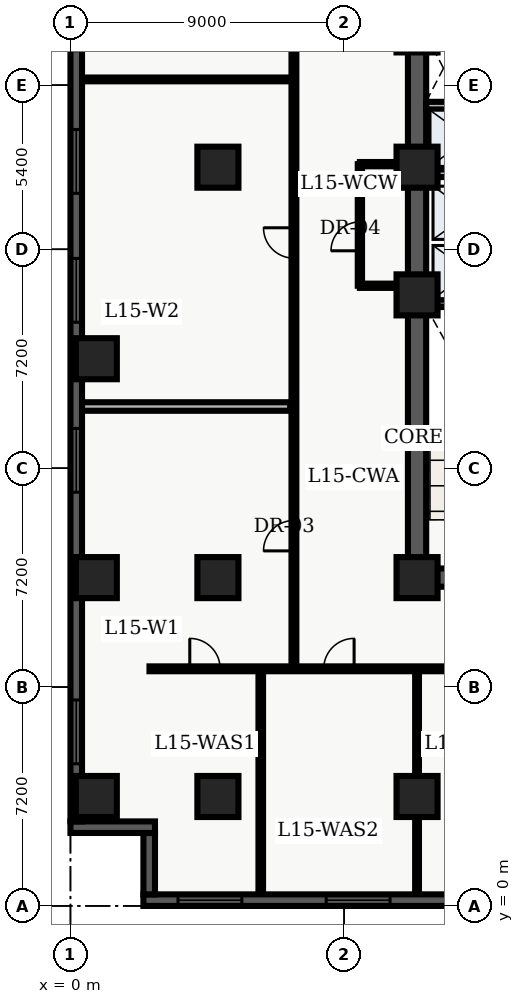
"""IFC4 building model, lengths in metres.
Left out: names, types, materials, properties, quantities, classifications, styles, units other than length and angle.
Written with IfcOpenShell. Run it as: python <this file> out.ifc"""

import sys

from ifc_helpers import new_model, entity, si_unit, converted_unit, direction, frame, origin_with_axes, origin_2d_with_axis, place, context, subcontext, project, spatial, polyline, rectangle, outline, extrude, element, fill, save


model = new_model("IFC4")
c1 = context("Model", 3, precision=1e-05, world=origin_with_axes(), true_north=direction((0.0, 1.0)))
c2 = subcontext(c1, "Body", "Model", "MODEL_VIEW")
j1 = project(units=[si_unit("LENGTHUNIT", "METRE"), converted_unit("PLANEANGLEUNIT", "DEGREE", entity("IfcPlaneAngleMeasure", 0.017), si_unit("PLANEANGLEUNIT", "RADIAN"), dimensions=[0, 0, 0, 0, 0, 0, 0])], contexts=[c1])
p1 = place(None, origin_with_axes())
s1 = spatial("IfcSite", under=j1, at=p1, CompositionType="ELEMENT")
p2 = place(p1, origin_with_axes())
s2 = spatial("IfcBuilding", under=s1, at=p2, CompositionType="ELEMENT")
p3 = place(p2, frame((0.0, 0.0, 63.9), z_axis=(0.0, 0.0, 1.0), x_axis=(1.0, 0.0, 0.0)))
s3 = spatial("IfcBuildingStorey", under=s2, at=p3, CompositionType="ELEMENT", Elevation=63.9)
p4 = place(p3, frame((11.4, 10.8, 0.0), z_axis=(0.0, 0.0, 1.0), x_axis=(0.0, 1.0, 0.0)))
e1 = element("IfcWall", 1, at=p4, inside=s3, PredefinedType="SHEAR", context=c2, shape_type="SweptSolid", body=[
    extrude(outline(polyline([(0.0, -0.3), (27.0, -0.3), (27.0, 0.3), (0.0, 0.3), (0.0, -0.3)])), origin_with_axes(), (0.0, 0.0, 1.0), 3.66),
])
p5 = place(p3, frame((11.4, 10.8, 0.0), z_axis=(0.0, 0.0, 1.0), x_axis=(1.0, 0.0, 0.0)))
e2 = element("IfcWall", 2, at=p5, inside=s3, PredefinedType="SHEAR", context=c2, shape_type="SweptSolid", body=[
    extrude(outline(polyline([(0.0, -0.3), (7.2, -0.3), (7.2, 0.3), (0.0, 0.3), (0.0, -0.3)])), origin_with_axes(), (0.0, 0.0, 1.0), 3.66),
])
p6 = place(p5, frame((2.625, 0.0, 0.0), z_axis=(0.0, 0.0, 1.0), x_axis=(1.0, 0.0, 0.0)))
e3 = element("IfcOpeningElement", 3, at=p6, cuts=e2, PredefinedType="OPENING", context=c2, shape_type="SweptSolid", body=[
    extrude(rectangle(XDim=1.05, YDim=0.62, at=origin_2d_with_axis()), origin_with_axes(), (0.0, 0.0, 1.0), 2.15),
])
p7 = place(p3, frame((11.7, 19.825, 0.0), z_axis=(0.0, 0.0, 1.0), x_axis=(1.0, 0.0, 0.0)))
e4 = element("IfcWall", 4, at=p7, inside=s3, PredefinedType="SHEAR", context=c2, shape_type="SweptSolid", body=[
    extrude(outline(polyline([(0.0, -0.125), (6.6, -0.125), (6.6, 0.125), (0.0, 0.125), (0.0, -0.125)])), origin_with_axes(), (0.0, 0.0, 1.0), 3.66),
])
p8 = place(p3, frame((11.7, 24.1, 0.0), z_axis=(0.0, 0.0, 1.0), x_axis=(1.0, 0.0, 0.0)))
e5 = element("IfcWall", 5, at=p8, inside=s3, PredefinedType="SOLIDWALL", context=c2, shape_type="SweptSolid", body=[
    extrude(outline(polyline([(0.0, -0.125), (6.6, -0.125), (6.6, 0.125), (0.0, 0.125), (0.0, -0.125)])), origin_with_axes(), (0.0, 0.0, 1.0), 2.7),
])
p9 = place(p8, frame((3.75, 0.0, 0.0), z_axis=(0.0, 0.0, 1.0), x_axis=(1.0, 0.0, 0.0)))
e6 = element("IfcOpeningElement", 6, at=p9, cuts=e5, PredefinedType="OPENING", context=c2, shape_type="SweptSolid", body=[
    extrude(rectangle(XDim=0.9, YDim=0.27, at=origin_2d_with_axis()), origin_with_axes(), (0.0, 0.0, 1.0), 2.15),
])
p10 = place(p3, frame((11.7, 26.325, 0.0), z_axis=(0.0, 0.0, 1.0), x_axis=(1.0, 0.0, 0.0)))
e7 = element("IfcWall", 7, at=p10, inside=s3, PredefinedType="SOLIDWALL", context=c2, shape_type="SweptSolid", body=[
    extrude(outline(polyline([(0.0, -0.125), (6.6, -0.125), (6.6, 0.125), (0.0, 0.125), (0.0, -0.125)])), origin_with_axes(), (0.0, 0.0, 1.0), 2.7),
])
p11 = place(p10, frame((3.5, 0.0, 0.0), z_axis=(0.0, 0.0, 1.0), x_axis=(1.0, 0.0, 0.0)))
e8 = element("IfcOpeningElement", 8, at=p11, cuts=e7, PredefinedType="OPENING", context=c2, shape_type="SweptSolid", body=[
    extrude(rectangle(XDim=0.9, YDim=0.27, at=origin_2d_with_axis()), origin_with_axes(), (0.0, 0.0, 1.0), 2.15),
])
for number, where, z_axis, x_axis in (
    (9, (11.4, 3.6, 0.0), (0.0, 0.0, 1.0), (1.0, 0.0, 0.0)),
    (10, (11.4, 10.8, 0.0), (0.0, 0.0, 1.0), (1.0, 0.0, 0.0)),
    (11, (11.4, 20.1, 0.0), (0.0, 0.0, 1.0), (1.0, 0.0, 0.0)),
    (12, (11.4, 24.3, 0.0), (0.0, 0.0, 1.0), (1.0, 0.0, 0.0)),
    (13, (11.4, 28.75, 0.0), (0.0, 0.0, 1.0), (1.0, 0.0, 0.0)),
    (14, (4.85, 3.6, 0.0), (0.0, 0.0, 1.0), (1.0, 0.0, 0.0)),
    (15, (4.85, 10.8, 0.0), (0.0, 0.0, 1.0), (1.0, 0.0, 0.0)),
    (16, (4.85, 24.3, 0.0), (0.0, 0.0, 1.0), (1.0, 0.0, 0.0)),
    (17, (0.85, 3.6, 0.0), (0.0, 0.0, 1.0), (1.0, 0.0, 0.0)),
    (18, (0.85, 10.8, 0.0), (0.0, 0.0, 1.0), (1.0, 0.0, 0.0)),
    (19, (0.85, 18.0, 0.0), (0.0, 0.0, 1.0), (1.0, 0.0, 0.0)),
):
    element("IfcColumn", number, at=place(p3, frame(where, z_axis=z_axis, x_axis=x_axis)), inside=s3, PredefinedType="COLUMN", context=c2, shape_type="SweptSolid", body=[
        extrude(rectangle(XDim=1.35, YDim=1.35, at=origin_2d_with_axis()), origin_with_axes(), (0.0, 0.0, 1.0), 3.9),
    ])
p12 = place(p3, frame((9.52, 20.4, 0.0), z_axis=(0.0, 0.0, 1.0), x_axis=(0.0, 1.0, 0.0)))
e20 = element("IfcWall", 20, at=p12, inside=s3, PredefinedType="PARTITIONING", context=c2, shape_type="SweptSolid", body=[
    extrude(outline(polyline([(0.0, -0.07), (4.0, -0.07), (4.0, 0.07), (0.0, 0.07), (0.0, -0.07)])), origin_with_axes(), (0.0, 0.0, 1.0), 2.7),
])
p13 = place(p12, frame((1.625, 0.0, 0.0), z_axis=(0.0, 0.0, 1.0), x_axis=(1.0, 0.0, 0.0)))
e21 = element("IfcOpeningElement", 21, at=p13, cuts=e20, PredefinedType="OPENING", context=c2, shape_type="SweptSolid", body=[
    extrude(rectangle(XDim=0.95, YDim=0.16, at=origin_2d_with_axis()), origin_with_axes(), (0.0, 0.0, 1.0), 2.15),
])
for number, where, z_axis, x_axis in (
    (22, (9.52, 20.4, 0.0), (0.0, 0.0, 1.0), (1.0, 0.0, 0.0)),
    (23, (9.52, 24.4, 0.0), (0.0, 0.0, 1.0), (1.0, 0.0, 0.0)),
):
    element("IfcWall", number, at=place(p3, frame(where, z_axis=z_axis, x_axis=x_axis)), inside=s3, PredefinedType="PARTITIONING", context=c2, shape_type="SweptSolid", body=[
        extrude(outline(polyline([(0.0, -0.07), (1.58, -0.07), (1.58, 0.07), (0.0, 0.07), (0.0, -0.07)])), origin_with_axes(), (0.0, 0.0, 1.0), 2.7),
    ])
p14 = place(p3, frame((2.6, 7.8, 0.0), z_axis=(0.0, 0.0, 1.0), x_axis=(1.0, 0.0, 0.0)))
e24 = element("IfcWall", 24, at=p14, inside=s3, PredefinedType="PARTITIONING", context=c2, shape_type="SweptSolid", body=[
    extrude(outline(polyline([(0.0, -0.08), (18.55, -0.08), (18.55, 0.08), (0.0, 0.08), (0.0, -0.08)])), origin_with_axes(), (0.0, 0.0, 1.0), 2.7),
])
p15 = place(p14, frame((1.825, 0.0, 0.0), z_axis=(0.0, 0.0, 1.0), x_axis=(1.0, 0.0, 0.0)))
e25 = element("IfcOpeningElement", 25, at=p15, cuts=e24, PredefinedType="OPENING", context=c2, shape_type="SweptSolid", body=[
    extrude(rectangle(XDim=1.0, YDim=0.18, at=origin_2d_with_axis()), origin_with_axes(), (0.0, 0.0, 1.0), 2.15),
])
p16 = place(p14, frame((6.229, 0.0, 0.0), z_axis=(0.0, 0.0, 1.0), x_axis=(1.0, 0.0, 0.0)))
e26 = element("IfcOpeningElement", 26, at=p16, cuts=e24, PredefinedType="OPENING", context=c2, shape_type="SweptSolid", body=[
    extrude(rectangle(XDim=1.0, YDim=0.18, at=origin_2d_with_axis()), origin_with_axes(), (0.0, 0.0, 1.0), 2.15),
])
p17 = place(p14, frame((10.706, 0.0, 0.0), z_axis=(0.0, 0.0, 1.0), x_axis=(1.0, 0.0, 0.0)))
e27 = element("IfcOpeningElement", 27, at=p17, cuts=e24, PredefinedType="OPENING", context=c2, shape_type="SweptSolid", body=[
    extrude(rectangle(XDim=1.0, YDim=0.18, at=origin_2d_with_axis()), origin_with_axes(), (0.0, 0.0, 1.0), 2.15),
])
p18 = place(p14, frame((15.556, 0.0, 0.0), z_axis=(0.0, 0.0, 1.0), x_axis=(1.0, 0.0, 0.0)))
e28 = element("IfcOpeningElement", 28, at=p18, cuts=e24, PredefinedType="OPENING", context=c2, shape_type="SweptSolid", body=[
    extrude(rectangle(XDim=1.0, YDim=0.18, at=origin_2d_with_axis()), origin_with_axes(), (0.0, 0.0, 1.0), 2.15),
])
p19 = place(p3, frame((7.35, 7.8, 0.0), z_axis=(0.0, 0.0, 1.0), x_axis=(0.0, 1.0, 0.0)))
e29 = element("IfcWall", 29, at=p19, inside=s3, PredefinedType="PARTITIONING", context=c2, shape_type="SweptSolid", body=[
    extrude(outline(polyline([(0.0, -0.08), (32.7, -0.08), (32.7, 0.08), (0.0, 0.08), (0.0, -0.08)])), origin_with_axes(), (0.0, 0.0, 1.0), 2.7),
])
p20 = place(p19, frame((4.379, 0.0, 0.0), z_axis=(0.0, 0.0, 1.0), x_axis=(1.0, 0.0, 0.0)))
e30 = element("IfcOpeningElement", 30, at=p20, cuts=e29, PredefinedType="OPENING", context=c2, shape_type="SweptSolid", body=[
    extrude(rectangle(XDim=1.0, YDim=0.18, at=origin_2d_with_axis()), origin_with_axes(), (0.0, 0.0, 1.0), 2.15),
])
p21 = place(p19, frame((14.008, 0.0, 0.0), z_axis=(0.0, 0.0, 1.0), x_axis=(1.0, 0.0, 0.0)))
e31 = element("IfcOpeningElement", 31, at=p21, cuts=e29, PredefinedType="OPENING", context=c2, shape_type="SweptSolid", body=[
    extrude(rectangle(XDim=1.0, YDim=0.18, at=origin_2d_with_axis()), origin_with_axes(), (0.0, 0.0, 1.0), 2.15),
])
p22 = place(p19, frame((25.979, 0.0, 0.0), z_axis=(0.0, 0.0, 1.0), x_axis=(1.0, 0.0, 0.0)))
e32 = element("IfcOpeningElement", 32, at=p22, cuts=e29, PredefinedType="OPENING", context=c2, shape_type="SweptSolid", body=[
    extrude(rectangle(XDim=1.0, YDim=0.18, at=origin_2d_with_axis()), origin_with_axes(), (0.0, 0.0, 1.0), 2.15),
])
p23 = place(p3, frame((0.375, 16.428, 0.0), z_axis=(0.0, 0.0, 1.0), x_axis=(1.0, 0.0, 0.0)))
e33 = element("IfcWall", 33, at=p23, inside=s3, PredefinedType="PARTITIONING", context=c2, shape_type="SweptSolid", body=[
    extrude(outline(polyline([(0.0, -0.14), (6.855, -0.14), (6.855, 0.14), (0.0, 0.14), (0.0, -0.14)])), origin_with_axes(), (0.0, 0.0, 1.0), 2.7),
])
p24 = place(p3, frame((0.375, 27.187, 0.0), z_axis=(0.0, 0.0, 1.0), x_axis=(1.0, 0.0, 0.0)))
e34 = element("IfcWall", 34, at=p24, inside=s3, PredefinedType="PARTITIONING", context=c2, shape_type="SweptSolid", body=[
    extrude(outline(polyline([(0.0, -0.062), (6.855, -0.062), (6.855, 0.062), (0.0, 0.062), (0.0, -0.062)])), origin_with_axes(), (0.0, 0.0, 1.0), 2.7),
])
p25 = place(p3, frame((6.259, 0.36, 0.0), z_axis=(0.0, 0.0, 1.0), x_axis=(0.0, 1.0, 0.0)))
e35 = element("IfcWall", 35, at=p25, inside=s3, PredefinedType="PARTITIONING", context=c2, shape_type="SweptSolid", body=[
    extrude(outline(polyline([(0.0, -0.075), (7.34, -0.075), (7.34, 0.075), (0.0, 0.075), (0.0, -0.075)])), origin_with_axes(), (0.0, 0.0, 1.0), 2.7),
])
p26 = place(p3, frame((11.4, 0.36, 0.0), z_axis=(0.0, 0.0, 1.0), x_axis=(0.0, 1.0, 0.0)))
e36 = element("IfcWall", 36, at=p26, inside=s3, PredefinedType="PARTITIONING", context=c2, shape_type="SweptSolid", body=[
    extrude(outline(polyline([(0.0, -0.062), (7.34, -0.062), (7.34, 0.062), (0.0, 0.062), (0.0, -0.062)])), origin_with_axes(), (0.0, 0.0, 1.0), 2.7),
])
p27 = place(p3, frame((57.22, 0.19, 0.0), z_axis=(0.0, 0.0, 1.0), x_axis=(-1.0, 0.0, 0.0)))
e37 = element("IfcWall", 37, at=p27, inside=s3, PredefinedType="SOLIDWALL", context=c2, shape_type="SweptSolid", body=[
    extrude(outline(polyline([(0.0, -0.19), (54.82, -0.19), (54.82, 0.19), (0.0, 0.19), (0.0, -0.19)])), origin_with_axes(), (0.0, 0.0, 1.0), 3.66),
])
p28 = place(p27, frame((3.037, 0.0, 0.45), z_axis=(0.0, 0.0, 1.0), x_axis=(1.0, 0.0, 0.0)))
e38 = element("IfcOpeningElement", 38, at=p28, cuts=e37, PredefinedType="OPENING", context=c2, shape_type="SweptSolid", body=[
    extrude(rectangle(XDim=2.1, YDim=0.4, at=origin_2d_with_axis()), origin_with_axes(), (0.0, 0.0, 1.0), 2.2),
])
p29 = place(p27, frame((7.912, 0.0, 0.45), z_axis=(0.0, 0.0, 1.0), x_axis=(1.0, 0.0, 0.0)))
e39 = element("IfcOpeningElement", 39, at=p29, cuts=e37, PredefinedType="OPENING", context=c2, shape_type="SweptSolid", body=[
    extrude(rectangle(XDim=2.1, YDim=0.4, at=origin_2d_with_axis()), origin_with_axes(), (0.0, 0.0, 1.0), 2.2),
])
p30 = place(p27, frame((12.786, 0.0, 0.45), z_axis=(0.0, 0.0, 1.0), x_axis=(1.0, 0.0, 0.0)))
e40 = element("IfcOpeningElement", 40, at=p30, cuts=e37, PredefinedType="OPENING", context=c2, shape_type="SweptSolid", body=[
    extrude(rectangle(XDim=2.1, YDim=0.4, at=origin_2d_with_axis()), origin_with_axes(), (0.0, 0.0, 1.0), 2.2),
])
p31 = place(p27, frame((17.661, 0.0, 0.45), z_axis=(0.0, 0.0, 1.0), x_axis=(1.0, 0.0, 0.0)))
e41 = element("IfcOpeningElement", 41, at=p31, cuts=e37, PredefinedType="OPENING", context=c2, shape_type="SweptSolid", body=[
    extrude(rectangle(XDim=2.1, YDim=0.4, at=origin_2d_with_axis()), origin_with_axes(), (0.0, 0.0, 1.0), 2.2),
])
p32 = place(p27, frame((22.535, 0.0, 0.45), z_axis=(0.0, 0.0, 1.0), x_axis=(1.0, 0.0, 0.0)))
e42 = element("IfcOpeningElement", 42, at=p32, cuts=e37, PredefinedType="OPENING", context=c2, shape_type="SweptSolid", body=[
    extrude(rectangle(XDim=2.1, YDim=0.4, at=origin_2d_with_axis()), origin_with_axes(), (0.0, 0.0, 1.0), 2.2),
])
p33 = place(p27, frame((27.41, 0.0, 0.45), z_axis=(0.0, 0.0, 1.0), x_axis=(1.0, 0.0, 0.0)))
e43 = element("IfcOpeningElement", 43, at=p33, cuts=e37, PredefinedType="OPENING", context=c2, shape_type="SweptSolid", body=[
    extrude(rectangle(XDim=2.1, YDim=0.4, at=origin_2d_with_axis()), origin_with_axes(), (0.0, 0.0, 1.0), 2.2),
])
p34 = place(p27, frame((32.285, 0.0, 0.45), z_axis=(0.0, 0.0, 1.0), x_axis=(1.0, 0.0, 0.0)))
e44 = element("IfcOpeningElement", 44, at=p34, cuts=e37, PredefinedType="OPENING", context=c2, shape_type="SweptSolid", body=[
    extrude(rectangle(XDim=2.1, YDim=0.4, at=origin_2d_with_axis()), origin_with_axes(), (0.0, 0.0, 1.0), 2.2),
])
p35 = place(p27, frame((37.159, 0.0, 0.45), z_axis=(0.0, 0.0, 1.0), x_axis=(1.0, 0.0, 0.0)))
e45 = element("IfcOpeningElement", 45, at=p35, cuts=e37, PredefinedType="OPENING", context=c2, shape_type="SweptSolid", body=[
    extrude(rectangle(XDim=2.1, YDim=0.4, at=origin_2d_with_axis()), origin_with_axes(), (0.0, 0.0, 1.0), 2.2),
])
p36 = place(p27, frame((47.758, 0.0, 0.45), z_axis=(0.0, 0.0, 1.0), x_axis=(1.0, 0.0, 0.0)))
e46 = element("IfcOpeningElement", 46, at=p36, cuts=e37, PredefinedType="OPENING", context=c2, shape_type="SweptSolid", body=[
    extrude(rectangle(XDim=2.1, YDim=0.4, at=origin_2d_with_axis()), origin_with_axes(), (0.0, 0.0, 1.0), 2.2),
])
p37 = place(p27, frame((52.633, 0.0, 0.45), z_axis=(0.0, 0.0, 1.0), x_axis=(1.0, 0.0, 0.0)))
e47 = element("IfcOpeningElement", 47, at=p37, cuts=e37, PredefinedType="OPENING", context=c2, shape_type="SweptSolid", body=[
    extrude(rectangle(XDim=2.1, YDim=0.4, at=origin_2d_with_axis()), origin_with_axes(), (0.0, 0.0, 1.0), 2.2),
])
p38 = place(p3, frame((2.59, 0.38, 0.0), z_axis=(0.0, 0.0, 1.0), x_axis=(0.0, 1.0, 0.0)))
e48 = element("IfcWall", 48, at=p38, inside=s3, PredefinedType="SOLIDWALL", context=c2, shape_type="SweptSolid", body=[
    extrude(outline(polyline([(0.0, -0.19), (2.02, -0.19), (2.02, 0.19), (0.0, 0.19), (0.0, -0.19)])), origin_with_axes(), (0.0, 0.0, 1.0), 3.66),
])
p39 = place(p3, frame((2.78, 2.59, 0.0), z_axis=(0.0, 0.0, 1.0), x_axis=(-1.0, 0.0, 0.0)))
e49 = element("IfcWall", 49, at=p39, inside=s3, PredefinedType="SOLIDWALL", context=c2, shape_type="SweptSolid", body=[
    extrude(outline(polyline([(0.0, -0.19), (2.78, -0.19), (2.78, 0.19), (0.0, 0.19), (0.0, -0.19)])), origin_with_axes(), (0.0, 0.0, 1.0), 3.66),
])
p40 = place(p3, frame((0.19, 2.78, 0.0), z_axis=(0.0, 0.0, 1.0), x_axis=(0.0, 1.0, 0.0)))
e50 = element("IfcWall", 50, at=p40, inside=s3, PredefinedType="SOLIDWALL", context=c2, shape_type="SweptSolid", body=[
    extrude(outline(polyline([(0.0, -0.19), (43.42, -0.19), (43.42, 0.19), (0.0, 0.19), (0.0, -0.19)])), origin_with_axes(), (0.0, 0.0, 1.0), 3.66),
])
p41 = place(p40, frame((2.946, 0.0, 0.45), z_axis=(0.0, 0.0, 1.0), x_axis=(1.0, 0.0, 0.0)))
e51 = element("IfcOpeningElement", 51, at=p41, cuts=e50, PredefinedType="OPENING", context=c2, shape_type="SweptSolid", body=[
    extrude(rectangle(XDim=2.1, YDim=0.4, at=origin_2d_with_axis()), origin_with_axes(), (0.0, 0.0, 1.0), 2.2),
])
p42 = place(p40, frame((11.878, 0.0, 0.45), z_axis=(0.0, 0.0, 1.0), x_axis=(1.0, 0.0, 0.0)))
e52 = element("IfcOpeningElement", 52, at=p42, cuts=e50, PredefinedType="OPENING", context=c2, shape_type="SweptSolid", body=[
    extrude(rectangle(XDim=2.1, YDim=0.4, at=origin_2d_with_axis()), origin_with_axes(), (0.0, 0.0, 1.0), 2.2),
])
p43 = place(p40, frame((17.469, 0.0, 0.45), z_axis=(0.0, 0.0, 1.0), x_axis=(1.0, 0.0, 0.0)))
e53 = element("IfcOpeningElement", 53, at=p43, cuts=e50, PredefinedType="OPENING", context=c2, shape_type="SweptSolid", body=[
    extrude(rectangle(XDim=2.1, YDim=0.4, at=origin_2d_with_axis()), origin_with_axes(), (0.0, 0.0, 1.0), 2.2),
])
p44 = place(p40, frame((21.71, 0.0, 0.45), z_axis=(0.0, 0.0, 1.0), x_axis=(1.0, 0.0, 0.0)))
e54 = element("IfcOpeningElement", 54, at=p44, cuts=e50, PredefinedType="OPENING", context=c2, shape_type="SweptSolid", body=[
    extrude(rectangle(XDim=2.1, YDim=0.4, at=origin_2d_with_axis()), origin_with_axes(), (0.0, 0.0, 1.0), 2.2),
])
p45 = place(p40, frame((26.401, 0.0, 0.45), z_axis=(0.0, 0.0, 1.0), x_axis=(1.0, 0.0, 0.0)))
e55 = element("IfcOpeningElement", 55, at=p45, cuts=e50, PredefinedType="OPENING", context=c2, shape_type="SweptSolid", body=[
    extrude(rectangle(XDim=2.1, YDim=0.4, at=origin_2d_with_axis()), origin_with_axes(), (0.0, 0.0, 1.0), 2.2),
])
p46 = place(p40, frame((31.092, 0.0, 0.45), z_axis=(0.0, 0.0, 1.0), x_axis=(1.0, 0.0, 0.0)))
e56 = element("IfcOpeningElement", 56, at=p46, cuts=e50, PredefinedType="OPENING", context=c2, shape_type="SweptSolid", body=[
    extrude(rectangle(XDim=2.1, YDim=0.4, at=origin_2d_with_axis()), origin_with_axes(), (0.0, 0.0, 1.0), 2.2),
])
p47 = place(p40, frame((40.024, 0.0, 0.45), z_axis=(0.0, 0.0, 1.0), x_axis=(1.0, 0.0, 0.0)))
e57 = element("IfcOpeningElement", 57, at=p47, cuts=e50, PredefinedType="OPENING", context=c2, shape_type="SweptSolid", body=[
    extrude(rectangle(XDim=2.1, YDim=0.4, at=origin_2d_with_axis()), origin_with_axes(), (0.0, 0.0, 1.0), 2.2),
])
p48 = place(p12, frame((1.625, 0.0, 0.0), z_axis=(0.0, 0.0, 1.0), x_axis=(1.0, 0.0, 0.0)))
e58 = element("IfcDoor", 58, at=p48, inside=s3, OperationType="SINGLE_SWING_LEFT", PredefinedType="DOOR", context=c2, shape_type="SweptSolid", body=[
    extrude(rectangle(XDim=0.95, YDim=0.084, at=origin_2d_with_axis()), origin_with_axes(), (0.0, 0.0, 1.0), 2.15),
])
fill(e21, e58)
p49 = place(p19, frame((4.379, 0.0, 0.0), z_axis=(0.0, 0.0, 1.0), x_axis=(1.0, 0.0, 0.0)))
e59 = element("IfcDoor", 59, at=p49, inside=s3, OperationType="SINGLE_SWING_LEFT", PredefinedType="DOOR", context=c2, shape_type="SweptSolid", body=[
    extrude(rectangle(XDim=1.0, YDim=0.09, at=origin_2d_with_axis()), origin_with_axes(), (0.0, 0.0, 1.0), 2.15),
])
fill(e30, e59)
p50 = place(p19, frame((14.008, 0.0, 0.0), z_axis=(0.0, 0.0, 1.0), x_axis=(1.0, 0.0, 0.0)))
e60 = element("IfcDoor", 60, at=p50, inside=s3, OperationType="SINGLE_SWING_RIGHT", PredefinedType="DOOR", context=c2, shape_type="SweptSolid", body=[
    extrude(rectangle(XDim=1.0, YDim=0.09, at=origin_2d_with_axis()), origin_with_axes(), (0.0, 0.0, 1.0), 2.15),
])
fill(e31, e60)
p51 = place(p14, frame((1.825, 0.0, 0.0), z_axis=(0.0, 0.0, 1.0), x_axis=(1.0, 0.0, 0.0)))
e61 = element("IfcDoor", 61, at=p51, inside=s3, OperationType="SINGLE_SWING_LEFT", PredefinedType="DOOR", context=c2, shape_type="SweptSolid", body=[
    extrude(rectangle(XDim=1.0, YDim=0.09, at=origin_2d_with_axis()), origin_with_axes(), (0.0, 0.0, 1.0), 2.15),
])
fill(e25, e61)
p52 = place(p14, frame((6.229, 0.0, 0.0), z_axis=(0.0, 0.0, 1.0), x_axis=(1.0, 0.0, 0.0)))
e62 = element("IfcDoor", 62, at=p52, inside=s3, OperationType="SINGLE_SWING_RIGHT", PredefinedType="DOOR", context=c2, shape_type="SweptSolid", body=[
    extrude(rectangle(XDim=1.0, YDim=0.09, at=origin_2d_with_axis()), origin_with_axes(), (0.0, 0.0, 1.0), 2.15),
])
fill(e26, e62)
p53 = place(p27, frame((47.758, 0.0, 0.45), z_axis=(0.0, 0.0, 1.0), x_axis=(1.0, 0.0, 0.0)))
e63 = element("IfcWindow", 63, at=p53, inside=s3, PredefinedType="WINDOW", context=c2, shape_type="SweptSolid", body=[
    extrude(rectangle(XDim=2.1, YDim=0.09, at=origin_2d_with_axis()), origin_with_axes(), (0.0, 0.0, 1.0), 2.2),
])
fill(e46, e63)
p54 = place(p27, frame((52.633, 0.0, 0.45), z_axis=(0.0, 0.0, 1.0), x_axis=(1.0, 0.0, 0.0)))
e64 = element("IfcWindow", 64, at=p54, inside=s3, PredefinedType="WINDOW", context=c2, shape_type="SweptSolid", body=[
    extrude(rectangle(XDim=2.1, YDim=0.09, at=origin_2d_with_axis()), origin_with_axes(), (0.0, 0.0, 1.0), 2.2),
])
fill(e47, e64)
p55 = place(p40, frame((2.946, 0.0, 0.45), z_axis=(0.0, 0.0, 1.0), x_axis=(1.0, 0.0, 0.0)))
e65 = element("IfcWindow", 65, at=p55, inside=s3, PredefinedType="WINDOW", context=c2, shape_type="SweptSolid", body=[
    extrude(rectangle(XDim=2.1, YDim=0.09, at=origin_2d_with_axis()), origin_with_axes(), (0.0, 0.0, 1.0), 2.2),
])
fill(e51, e65)
p56 = place(p40, frame((11.878, 0.0, 0.45), z_axis=(0.0, 0.0, 1.0), x_axis=(1.0, 0.0, 0.0)))
e66 = element("IfcWindow", 66, at=p56, inside=s3, PredefinedType="WINDOW", context=c2, shape_type="SweptSolid", body=[
    extrude(rectangle(XDim=2.1, YDim=0.09, at=origin_2d_with_axis()), origin_with_axes(), (0.0, 0.0, 1.0), 2.2),
])
fill(e52, e66)
p57 = place(p40, frame((17.469, 0.0, 0.45), z_axis=(0.0, 0.0, 1.0), x_axis=(1.0, 0.0, 0.0)))
e67 = element("IfcWindow", 67, at=p57, inside=s3, PredefinedType="WINDOW", context=c2, shape_type="SweptSolid", body=[
    extrude(rectangle(XDim=2.1, YDim=0.09, at=origin_2d_with_axis()), origin_with_axes(), (0.0, 0.0, 1.0), 2.2),
])
fill(e53, e67)
p58 = place(p40, frame((21.71, 0.0, 0.45), z_axis=(0.0, 0.0, 1.0), x_axis=(1.0, 0.0, 0.0)))
e68 = element("IfcWindow", 68, at=p58, inside=s3, PredefinedType="WINDOW", context=c2, shape_type="SweptSolid", body=[
    extrude(rectangle(XDim=2.1, YDim=0.09, at=origin_2d_with_axis()), origin_with_axes(), (0.0, 0.0, 1.0), 2.2),
])
fill(e54, e68)
save(model, sys.argv[1])
